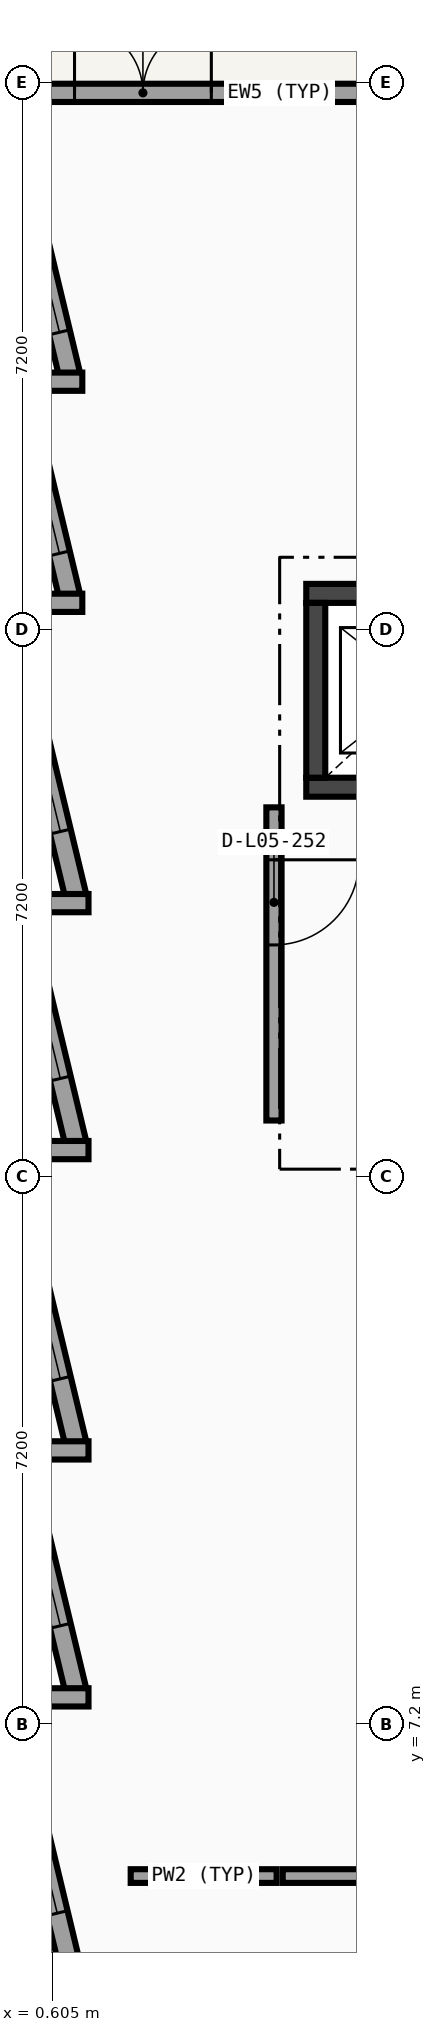
"""IFC4 building model, lengths in metres.
Left out: names, types, materials, properties, quantities, classifications, styles, units other than length and angle.
Written with IfcOpenShell. Run it as: python <this file> out.ifc"""

import sys

from ifc_helpers import new_model, si_unit, direction, frame, frame_2d, origin, place, context, subcontext, project, spatial, rectangle, extrude, element, fill, save


model = new_model("IFC4")
c1 = context("Model", 3, precision=1e-05, world=origin(), true_north=direction((0.0, 1.0)))
c2 = subcontext(c1, "Body", "Model", "MODEL_VIEW")
j1 = project(units=[si_unit("LENGTHUNIT", "METRE"), si_unit("PLANEANGLEUNIT", "RADIAN")], contexts=[c1])
p1 = place(None, origin())
s1 = spatial("IfcSite", under=j1, at=p1, CompositionType="ELEMENT")
p2 = place(p1, origin())
s2 = spatial("IfcBuilding", under=s1, at=p2, CompositionType="ELEMENT")
p3 = place(p2, frame((0.0, 0.0, 22.95)))
s3 = spatial("IfcBuildingStorey", under=s2, at=p3, CompositionType="ELEMENT", Elevation=22.95)
p4 = place(p3, frame((0.836, 4.032, 0.0), z_axis=(0.0, 0.0, 1.0), x_axis=(-0.233462206666, 0.972365876643, 0.0)))
e1 = element("IfcWall", 1, at=p4, inside=s3, PredefinedType="SOLIDWALL", context=c2, shape_type="SweptSolid", body=[
    extrude(rectangle(XDim=2.897, YDim=0.28, at=frame_2d((1.448, 0.0))), origin(), (0.0, 0.0, 1.0), 3.216),
])
p5 = place(p4, frame((0.698, 0.0, 0.8)))
e2 = element("IfcOpeningElement", 2, at=p5, cuts=e1, PredefinedType="OPENING", context=c2, shape_type="SweptSolid", body=[
    extrude(rectangle(XDim=1.5, YDim=1.7, at=frame_2d((0.75, 0.85))), frame((0.0, 0.15, 0.0), z_axis=(0.0, -1.0, 0.0), x_axis=(1.0, 0.0, 0.0)), (0.0, 0.0, 1.0), 0.3),
])
p6 = place(p3, frame((0.918, 7.643, 0.0), z_axis=(0.0, 0.0, 1.0), x_axis=(-0.233429837788, 0.972373647746, 0.0)))
e3 = element("IfcWall", 3, at=p6, inside=s3, PredefinedType="SOLIDWALL", context=c2, shape_type="SweptSolid", body=[
    extrude(rectangle(XDim=3.246, YDim=0.28, at=frame_2d((1.623, 0.0))), origin(), (0.0, 0.0, 1.0), 3.216),
])
p7 = place(p6, frame((0.873, 0.0, 0.8)))
e4 = element("IfcOpeningElement", 4, at=p7, cuts=e3, PredefinedType="OPENING", context=c2, shape_type="SweptSolid", body=[
    extrude(rectangle(XDim=1.5, YDim=1.7, at=frame_2d((0.75, 0.85))), frame((0.0, 0.15, 0.0), z_axis=(0.0, -1.0, 0.0), x_axis=(1.0, 0.0, 0.0)), (0.0, 0.0, 1.0), 0.3),
])
p8 = place(p3, frame((1.085, 7.551, 0.0), z_axis=(0.0, 0.0, 1.0), x_axis=(-1.0, 0.0, 0.0)))
e5 = element("IfcWall", 5, at=p8, inside=s3, PredefinedType="SOLIDWALL", context=c2, shape_type="SweptSolid", body=[
    extrude(rectangle(XDim=0.793, YDim=0.24, at=frame_2d((0.396, 0.0))), origin(), (0.0, 0.0, 1.0), 3.8),
])
p9 = place(p3, frame((0.918, 10.892, 0.0), z_axis=(0.0, 0.0, 1.0), x_axis=(-0.233429837788, 0.972373647746, 0.0)))
e6 = element("IfcWall", 6, at=p9, inside=s3, PredefinedType="SOLIDWALL", context=c2, shape_type="SweptSolid", body=[
    extrude(rectangle(XDim=3.246, YDim=0.28, at=frame_2d((1.623, 0.0))), origin(), (0.0, 0.0, 1.0), 3.216),
])
p10 = place(p9, frame((0.873, 0.0, 0.8)))
e7 = element("IfcOpeningElement", 7, at=p10, cuts=e6, PredefinedType="OPENING", context=c2, shape_type="SweptSolid", body=[
    extrude(rectangle(XDim=1.5, YDim=1.7, at=frame_2d((0.75, 0.85))), frame((0.0, 0.15, 0.0), z_axis=(0.0, -1.0, 0.0), x_axis=(1.0, 0.0, 0.0)), (0.0, 0.0, 1.0), 0.3),
])
p11 = place(p3, frame((1.085, 10.8, 0.0), z_axis=(0.0, 0.0, 1.0), x_axis=(-1.0, 0.0, 0.0)))
e8 = element("IfcWall", 8, at=p11, inside=s3, PredefinedType="SOLIDWALL", context=c2, shape_type="SweptSolid", body=[
    extrude(rectangle(XDim=0.793, YDim=0.24, at=frame_2d((0.396, 0.0))), origin(), (0.0, 0.0, 1.0), 3.8),
])
p12 = place(p3, frame((0.918, 14.844, 0.0), z_axis=(0.0, 0.0, 1.0), x_axis=(-0.233446908634, 0.972369549528, 0.0)))
e9 = element("IfcWall", 9, at=p12, inside=s3, PredefinedType="SOLIDWALL", context=c2, shape_type="SweptSolid", body=[
    extrude(rectangle(XDim=3.246, YDim=0.28, at=frame_2d((1.623, 0.0))), origin(), (0.0, 0.0, 1.0), 3.216),
])
p13 = place(p12, frame((0.873, 0.0, 0.8)))
e10 = element("IfcOpeningElement", 10, at=p13, cuts=e9, PredefinedType="OPENING", context=c2, shape_type="SweptSolid", body=[
    extrude(rectangle(XDim=1.5, YDim=1.7, at=frame_2d((0.75, 0.85))), frame((0.0, 0.15, 0.0), z_axis=(0.0, -1.0, 0.0), x_axis=(1.0, 0.0, 0.0)), (0.0, 0.0, 1.0), 0.3),
])
p14 = place(p3, frame((1.085, 14.751, 0.0), z_axis=(0.0, 0.0, 1.0), x_axis=(-1.0, 0.0, 0.0)))
e11 = element("IfcWall", 11, at=p14, inside=s3, PredefinedType="SOLIDWALL", context=c2, shape_type="SweptSolid", body=[
    extrude(rectangle(XDim=0.793, YDim=0.24, at=frame_2d((0.396, 0.0))), origin(), (0.0, 0.0, 1.0), 3.8),
])
p15 = place(p3, frame((0.918, 18.092, 0.0), z_axis=(0.0, 0.0, 1.0), x_axis=(-0.233429837788, 0.972373647746, 0.0)))
e12 = element("IfcWall", 12, at=p15, inside=s3, PredefinedType="SOLIDWALL", context=c2, shape_type="SweptSolid", body=[
    extrude(rectangle(XDim=3.246, YDim=0.28, at=frame_2d((1.623, 0.0))), origin(), (0.0, 0.0, 1.0), 3.216),
])
p16 = place(p15, frame((0.873, 0.0, 0.8)))
e13 = element("IfcOpeningElement", 13, at=p16, cuts=e12, PredefinedType="OPENING", context=c2, shape_type="SweptSolid", body=[
    extrude(rectangle(XDim=1.5, YDim=1.7, at=frame_2d((0.75, 0.85))), frame((0.0, 0.15, 0.0), z_axis=(0.0, -1.0, 0.0), x_axis=(1.0, 0.0, 0.0)), (0.0, 0.0, 1.0), 0.3),
])
p17 = place(p3, frame((1.085, 18.0, 0.0), z_axis=(0.0, 0.0, 1.0), x_axis=(-1.0, 0.0, 0.0)))
e14 = element("IfcWall", 14, at=p17, inside=s3, PredefinedType="SOLIDWALL", context=c2, shape_type="SweptSolid", body=[
    extrude(rectangle(XDim=0.793, YDim=0.24, at=frame_2d((0.396, 0.0))), origin(), (0.0, 0.0, 1.0), 3.8),
])
p18 = place(p3, frame((0.836, 22.043, 0.0), z_axis=(0.0, 0.0, 1.0), x_axis=(-0.233462206666, 0.972365876643, 0.0)))
e15 = element("IfcWall", 15, at=p18, inside=s3, PredefinedType="SOLIDWALL", context=c2, shape_type="SweptSolid", body=[
    extrude(rectangle(XDim=2.897, YDim=0.28, at=frame_2d((1.448, 0.0))), origin(), (0.0, 0.0, 1.0), 3.216),
])
p19 = place(p18, frame((0.573, 0.0, 0.8)))
e16 = element("IfcOpeningElement", 16, at=p19, cuts=e15, PredefinedType="OPENING", context=c2, shape_type="SweptSolid", body=[
    extrude(rectangle(XDim=1.75, YDim=2.05, at=frame_2d((0.875, 1.025))), frame((0.0, 0.15, 0.0), z_axis=(0.0, -1.0, 0.0), x_axis=(1.0, 0.0, 0.0)), (0.0, 0.0, 1.0), 0.3),
])
p20 = place(p3, frame((1.003, 21.951, 0.0), z_axis=(0.0, 0.0, 1.0), x_axis=(-1.0, 0.0, 0.0)))
e17 = element("IfcWall", 17, at=p20, inside=s3, PredefinedType="SOLIDWALL", context=c2, shape_type="SweptSolid", body=[
    extrude(rectangle(XDim=0.711, YDim=0.24, at=frame_2d((0.356, 0.0))), origin(), (0.0, 0.0, 1.0), 3.8),
])
p21 = place(p3, frame((0.836, 24.952, 0.0), z_axis=(0.0, 0.0, 1.0), x_axis=(-0.233462206666, 0.972365876643, 0.0)))
e18 = element("IfcWall", 18, at=p21, inside=s3, PredefinedType="SOLIDWALL", context=c2, shape_type="SweptSolid", body=[
    extrude(rectangle(XDim=2.897, YDim=0.28, at=frame_2d((1.448, 0.0))), origin(), (0.0, 0.0, 1.0), 3.216),
])
p22 = place(p21, frame((0.573, 0.0, 0.8)))
e19 = element("IfcOpeningElement", 19, at=p22, cuts=e18, PredefinedType="OPENING", context=c2, shape_type="SweptSolid", body=[
    extrude(rectangle(XDim=1.75, YDim=2.05, at=frame_2d((0.875, 1.025))), frame((0.0, 0.15, 0.0), z_axis=(0.0, -1.0, 0.0), x_axis=(1.0, 0.0, 0.0)), (0.0, 0.0, 1.0), 0.3),
])
p23 = place(p3, frame((1.003, 24.86, 0.0), z_axis=(0.0, 0.0, 1.0), x_axis=(-1.0, 0.0, 0.0)))
e20 = element("IfcWall", 20, at=p23, inside=s3, PredefinedType="SOLIDWALL", context=c2, shape_type="SweptSolid", body=[
    extrude(rectangle(XDim=0.711, YDim=0.24, at=frame_2d((0.356, 0.0))), origin(), (0.0, 0.0, 1.0), 3.8),
])
p24 = place(p3, frame((0.351, 28.66, 0.0), z_axis=(0.0, 0.0, 1.0), x_axis=(1.0, 0.0, 0.0)))
e21 = element("IfcWall", 21, at=p24, inside=s3, PredefinedType="SOLIDWALL", context=c2, shape_type="SweptSolid", body=[
    extrude(rectangle(XDim=6.498, YDim=0.24, at=frame_2d((3.249, 0.0))), origin(), (0.0, 0.0, 1.0), 3.206),
])
p25 = place(p24, frame((0.55, 0.0, 0.0)))
e22 = element("IfcOpeningElement", 22, at=p25, cuts=e21, PredefinedType="OPENING", context=c2, shape_type="SweptSolid", body=[
    extrude(rectangle(XDim=1.8, YDim=2.15, at=frame_2d((0.9, 1.075))), frame((0.0, 0.13, 0.0), z_axis=(0.0, -1.0, 0.0), x_axis=(1.0, 0.0, 0.0)), (0.0, 0.0, 1.0), 0.26),
])
p26 = place(p24, frame((4.648, 0.0, 0.85)))
e23 = element("IfcOpeningElement", 23, at=p26, cuts=e21, PredefinedType="OPENING", context=c2, shape_type="SweptSolid", body=[
    extrude(rectangle(XDim=1.2, YDim=1.95, at=frame_2d((0.6, 0.975))), frame((0.0, 0.13, 0.0), z_axis=(0.0, -1.0, 0.0), x_axis=(1.0, 0.0, 0.0)), (0.0, 0.0, 1.0), 0.26),
])
p27 = place(p3, frame((3.95, 19.525, 0.0), z_axis=(0.0, 0.0, 1.0), x_axis=(1.0, 0.0, 0.0)))
e24 = element("IfcWall", 24, at=p27, inside=s3, PredefinedType="SHEAR", context=c2, shape_type="SweptSolid", body=[
    extrude(rectangle(XDim=3.0, YDim=0.25, at=frame_2d((1.5, 0.0))), origin(), (0.0, 0.0, 1.0), 3.8),
])
p28 = place(p27, frame((0.925, 0.0, 0.0)))
e25 = element("IfcOpeningElement", 25, at=p28, cuts=e24, PredefinedType="OPENING", context=c2, shape_type="SweptSolid", body=[
    extrude(rectangle(XDim=1.15, YDim=2.1, at=frame_2d((0.575, 1.05))), frame((0.0, 0.135, 0.0), z_axis=(0.0, -1.0, 0.0), x_axis=(1.0, 0.0, 0.0)), (0.0, 0.0, 1.0), 0.27),
])
p29 = place(p3, frame((6.95, 22.075, 0.0), z_axis=(0.0, 0.0, 1.0), x_axis=(-1.0, 0.0, 0.0)))
e26 = element("IfcWall", 26, at=p29, inside=s3, PredefinedType="SHEAR", context=c2, shape_type="SweptSolid", body=[
    extrude(rectangle(XDim=3.0, YDim=0.25, at=frame_2d((1.5, 0.0))), origin(), (0.0, 0.0, 1.0), 3.8),
])
p30 = place(p3, frame((4.075, 21.95, 0.0), z_axis=(0.0, 0.0, 1.0), x_axis=(0.0, -1.0, 0.0)))
e27 = element("IfcWall", 27, at=p30, inside=s3, PredefinedType="SHEAR", context=c2, shape_type="SweptSolid", body=[
    extrude(rectangle(XDim=2.3, YDim=0.25, at=frame_2d((1.15, 0.0))), origin(), (0.0, 0.0, 1.0), 3.8),
])
p31 = place(p3, frame((3.525, 15.14, 0.0), z_axis=(0.0, 0.0, 1.0), x_axis=(0.0, 1.0, 0.0)))
e28 = element("IfcWall", 28, at=p31, inside=s3, PredefinedType="PARTITIONING", context=c2, shape_type="SweptSolid", body=[
    extrude(rectangle(XDim=4.12, YDim=0.2, at=frame_2d((2.06, 0.0))), origin(), (0.0, 0.0, 1.0), 3.8),
])
p32 = place(p31, frame((2.31, 0.0, 0.0)))
e29 = element("IfcOpeningElement", 29, at=p32, cuts=e28, PredefinedType="OPENING", context=c2, shape_type="SweptSolid", body=[
    extrude(rectangle(XDim=1.12, YDim=2.1, at=frame_2d((0.56, 1.05))), frame((0.0, 0.11, 0.0), z_axis=(0.0, -1.0, 0.0), x_axis=(1.0, 0.0, 0.0)), (0.0, 0.0, 1.0), 0.22),
])
p33 = place(p3, frame((1.64, 5.2, 0.0), z_axis=(0.0, 0.0, 1.0), x_axis=(1.0, 0.0, 0.0)))
e30 = element("IfcWall", 30, at=p33, inside=s3, PredefinedType="PARTITIONING", context=c2, shape_type="SweptSolid", body=[
    extrude(rectangle(XDim=1.92, YDim=0.18, at=frame_2d((0.96, 0.0))), origin(), (0.0, 0.0, 1.0), 3.8),
])
p34 = place(p3, frame((3.64, 5.2, 0.0), z_axis=(0.0, 0.0, 1.0), x_axis=(1.0, 0.0, 0.0)))
e31 = element("IfcWall", 31, at=p34, inside=s3, PredefinedType="PARTITIONING", context=c2, shape_type="SweptSolid", body=[
    extrude(rectangle(XDim=20.92, YDim=0.18, at=frame_2d((10.46, 0.0))), origin(), (0.0, 0.0, 1.0), 3.206),
])
p35 = place(p34, frame((14.692, 0.0, 0.0)))
e32 = element("IfcOpeningElement", 32, at=p35, cuts=e31, PredefinedType="OPENING", context=c2, shape_type="SweptSolid", body=[
    extrude(rectangle(XDim=1.05, YDim=2.15, at=frame_2d((0.525, 1.075))), frame((0.0, 0.1, 0.0), z_axis=(0.0, -1.0, 0.0), x_axis=(1.0, 0.0, 0.0)), (0.0, 0.0, 1.0), 0.2),
])
p36 = place(p5, origin())
e33 = element("IfcWindow", 33, at=p36, inside=s3, PartitioningType="SINGLE_PANEL", PredefinedType="WINDOW", context=c2, shape_type="SweptSolid", body=[
    extrude(rectangle(XDim=1.5, YDim=1.7, at=frame_2d((0.75, 0.85))), frame((0.0, 0.03, 0.0), z_axis=(0.0, -1.0, 0.0), x_axis=(1.0, 0.0, 0.0)), (0.0, 0.0, 1.0), 0.06),
])
fill(e2, e33)
p37 = place(p7, origin())
e34 = element("IfcWindow", 34, at=p37, inside=s3, PartitioningType="SINGLE_PANEL", PredefinedType="WINDOW", context=c2, shape_type="SweptSolid", body=[
    extrude(rectangle(XDim=1.5, YDim=1.7, at=frame_2d((0.75, 0.85))), frame((0.0, 0.03, 0.0), z_axis=(0.0, -1.0, 0.0), x_axis=(1.0, 0.0, 0.0)), (0.0, 0.0, 1.0), 0.06),
])
fill(e4, e34)
p38 = place(p10, origin())
e35 = element("IfcWindow", 35, at=p38, inside=s3, PartitioningType="SINGLE_PANEL", PredefinedType="WINDOW", context=c2, shape_type="SweptSolid", body=[
    extrude(rectangle(XDim=1.5, YDim=1.7, at=frame_2d((0.75, 0.85))), frame((0.0, 0.03, 0.0), z_axis=(0.0, -1.0, 0.0), x_axis=(1.0, 0.0, 0.0)), (0.0, 0.0, 1.0), 0.06),
])
fill(e7, e35)
p39 = place(p13, origin())
e36 = element("IfcWindow", 36, at=p39, inside=s3, PartitioningType="SINGLE_PANEL", PredefinedType="WINDOW", context=c2, shape_type="SweptSolid", body=[
    extrude(rectangle(XDim=1.5, YDim=1.7, at=frame_2d((0.75, 0.85))), frame((0.0, 0.03, 0.0), z_axis=(0.0, -1.0, 0.0), x_axis=(1.0, 0.0, 0.0)), (0.0, 0.0, 1.0), 0.06),
])
fill(e10, e36)
p40 = place(p16, origin())
e37 = element("IfcWindow", 37, at=p40, inside=s3, PartitioningType="SINGLE_PANEL", PredefinedType="WINDOW", context=c2, shape_type="SweptSolid", body=[
    extrude(rectangle(XDim=1.5, YDim=1.7, at=frame_2d((0.75, 0.85))), frame((0.0, 0.03, 0.0), z_axis=(0.0, -1.0, 0.0), x_axis=(1.0, 0.0, 0.0)), (0.0, 0.0, 1.0), 0.06),
])
fill(e13, e37)
p41 = place(p19, origin())
e38 = element("IfcWindow", 38, at=p41, inside=s3, PartitioningType="SINGLE_PANEL", PredefinedType="WINDOW", context=c2, shape_type="SweptSolid", body=[
    extrude(rectangle(XDim=1.75, YDim=2.05, at=frame_2d((0.875, 1.025))), frame((0.0, 0.03, 0.0), z_axis=(0.0, -1.0, 0.0), x_axis=(1.0, 0.0, 0.0)), (0.0, 0.0, 1.0), 0.06),
])
fill(e16, e38)
p42 = place(p22, origin())
e39 = element("IfcWindow", 39, at=p42, inside=s3, PartitioningType="SINGLE_PANEL", PredefinedType="WINDOW", context=c2, shape_type="SweptSolid", body=[
    extrude(rectangle(XDim=1.75, YDim=2.05, at=frame_2d((0.875, 1.025))), frame((0.0, 0.03, 0.0), z_axis=(0.0, -1.0, 0.0), x_axis=(1.0, 0.0, 0.0)), (0.0, 0.0, 1.0), 0.06),
])
fill(e19, e39)
p43 = place(p25, origin())
e40 = element("IfcDoor", 40, at=p43, inside=s3, OperationType="DOUBLE_DOOR_SINGLE_SWING", PredefinedType="DOOR", context=c2, shape_type="SweptSolid", body=[
    extrude(rectangle(XDim=1.8, YDim=2.15, at=frame_2d((0.9, 1.075))), frame((0.0, 0.025, 0.0), z_axis=(0.0, -1.0, 0.0), x_axis=(1.0, 0.0, 0.0)), (0.0, 0.0, 1.0), 0.05),
])
fill(e22, e40)
p44 = place(p32, origin())
e41 = element("IfcDoor", 41, at=p44, inside=s3, OperationType="SINGLE_SWING_RIGHT", PredefinedType="DOOR", context=c2, shape_type="SweptSolid", body=[
    extrude(rectangle(XDim=1.12, YDim=2.1, at=frame_2d((0.56, 1.05))), frame((0.0, 0.025, 0.0), z_axis=(0.0, -1.0, 0.0), x_axis=(1.0, 0.0, 0.0)), (0.0, 0.0, 1.0), 0.05),
])
fill(e29, e41)
save(model, sys.argv[1])
